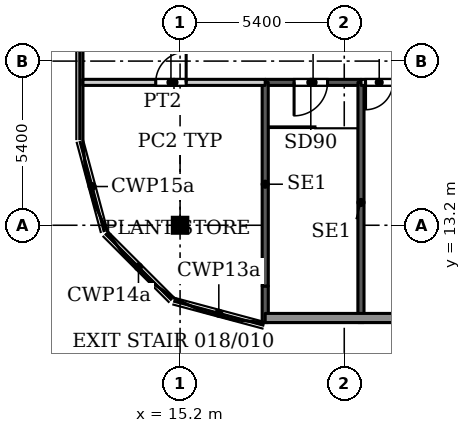
"""IFC4 building model, lengths in metres.
Left out: names, types, materials, properties, quantities, classifications, styles, units other than length and angle.
Written with IfcOpenShell. Run it as: python <this file> out.ifc"""

import sys

from ifc_helpers import new_model, si_unit, direction, frame, frame_2d, origin, origin_2d, place, context, subcontext, project, spatial, rectangle, i_section, extrude, source, transform, mapped, element, fill, save


model = new_model("IFC4")
c1 = context("Model", 3, precision=1e-05, world=origin(), true_north=direction((0.0, 1.0)))
c2 = subcontext(c1, "Body", "Model", "MODEL_VIEW")
j1 = project(units=[si_unit("LENGTHUNIT", "METRE"), si_unit("PLANEANGLEUNIT", "RADIAN")], contexts=[c1])
p1 = place(None, origin())
s1 = spatial("IfcSite", under=j1, at=p1, CompositionType="ELEMENT")
p2 = place(p1, origin())
s2 = spatial("IfcBuilding", under=s1, at=p2, CompositionType="ELEMENT")
p3 = place(p2, frame((0.0, 0.0, 26.0)))
s3 = spatial("IfcBuildingStorey", under=s2, at=p3, CompositionType="ELEMENT", Elevation=26.0)
p4 = place(p3, frame((15.2, 13.2, 0.0), z_axis=(0.0, 0.0, 1.0), x_axis=(1.0, 0.0, 0.0)))
e1 = element("IfcColumn", 1, at=p4, inside=s3, PredefinedType="COLUMN", context=c2, shape_type="SweptSolid", body=[
    extrude(i_section(OverallWidth=0.409, OverallDepth=0.425, WebThickness=0.033, FlangeThickness=0.052, FilletRadius=0.013, at=origin_2d()), origin(), (0.0, 0.0, 1.0), 4.5),
])
p5 = place(p3, frame((65.52, 10.15, 0.0), z_axis=(0.0, 0.0, 1.0), x_axis=(-1.0, 0.0, 0.0)))
e2 = element("IfcWall", 2, at=p5, inside=s3, PredefinedType="SOLIDWALL", context=c2, shape_type="SweptSolid", body=[
    extrude(rectangle(XDim=47.52, YDim=0.3, at=frame_2d((23.76, 0.0))), origin(), (0.0, 0.0, 1.0), 4.25),
])
p6 = place(p5, frame((1.683, 0.0, 2.4)))
e3 = element("IfcOpeningElement", 3, at=p6, cuts=e2, PredefinedType="OPENING", context=c2, shape_type="SweptSolid", body=[
    extrude(rectangle(XDim=2.7, YDim=1.2, at=frame_2d((1.35, 0.6))), frame((0.0, 0.16, 0.0), z_axis=(0.0, -1.0, 0.0), x_axis=(1.0, 0.0, 0.0)), (0.0, 0.0, 1.0), 0.32),
])
p7 = place(p5, frame((7.15, 0.0, 2.4)))
e4 = element("IfcOpeningElement", 4, at=p7, cuts=e2, PredefinedType="OPENING", context=c2, shape_type="SweptSolid", body=[
    extrude(rectangle(XDim=2.7, YDim=1.2, at=frame_2d((1.35, 0.6))), frame((0.0, 0.16, 0.0), z_axis=(0.0, -1.0, 0.0), x_axis=(1.0, 0.0, 0.0)), (0.0, 0.0, 1.0), 0.32),
])
p8 = place(p5, frame((12.617, 0.0, 2.4)))
e5 = element("IfcOpeningElement", 5, at=p8, cuts=e2, PredefinedType="OPENING", context=c2, shape_type="SweptSolid", body=[
    extrude(rectangle(XDim=2.7, YDim=1.2, at=frame_2d((1.35, 0.6))), frame((0.0, 0.16, 0.0), z_axis=(0.0, -1.0, 0.0), x_axis=(1.0, 0.0, 0.0)), (0.0, 0.0, 1.0), 0.32),
])
p9 = place(p5, frame((19.06, 0.0, 2.4)))
e6 = element("IfcOpeningElement", 6, at=p9, cuts=e2, PredefinedType="OPENING", context=c2, shape_type="SweptSolid", body=[
    extrude(rectangle(XDim=2.7, YDim=1.2, at=frame_2d((1.35, 0.6))), frame((0.0, 0.16, 0.0), z_axis=(0.0, -1.0, 0.0), x_axis=(1.0, 0.0, 0.0)), (0.0, 0.0, 1.0), 0.32),
])
p10 = place(p5, frame((25.28, 0.0, 2.4)))
e7 = element("IfcOpeningElement", 7, at=p10, cuts=e2, PredefinedType="OPENING", context=c2, shape_type="SweptSolid", body=[
    extrude(rectangle(XDim=2.7, YDim=1.2, at=frame_2d((1.35, 0.6))), frame((0.0, 0.16, 0.0), z_axis=(0.0, -1.0, 0.0), x_axis=(1.0, 0.0, 0.0)), (0.0, 0.0, 1.0), 0.32),
])
p11 = place(p5, frame((32.1, 0.0, 2.4)))
e8 = element("IfcOpeningElement", 8, at=p11, cuts=e2, PredefinedType="OPENING", context=c2, shape_type="SweptSolid", body=[
    extrude(rectangle(XDim=2.7, YDim=1.2, at=frame_2d((1.35, 0.6))), frame((0.0, 0.16, 0.0), z_axis=(0.0, -1.0, 0.0), x_axis=(1.0, 0.0, 0.0)), (0.0, 0.0, 1.0), 0.32),
])
p12 = place(p5, frame((38.32, 0.0, 2.4)))
e9 = element("IfcOpeningElement", 9, at=p12, cuts=e2, PredefinedType="OPENING", context=c2, shape_type="SweptSolid", body=[
    extrude(rectangle(XDim=2.7, YDim=1.2, at=frame_2d((1.35, 0.6))), frame((0.0, 0.16, 0.0), z_axis=(0.0, -1.0, 0.0), x_axis=(1.0, 0.0, 0.0)), (0.0, 0.0, 1.0), 0.32),
])
p13 = place(p3, frame((18.0, 17.9, 0.0), z_axis=(0.0, 0.0, 1.0), x_axis=(1.0, 0.0, 0.0)))
e10 = element("IfcWall", 10, at=p13, inside=s3, PredefinedType="SHEAR", context=c2, shape_type="SweptSolid", body=[
    extrude(rectangle(XDim=3.15, YDim=0.2, at=frame_2d((1.575, 0.0))), origin(), (0.0, 0.0, 1.0), 4.5),
])
p14 = place(p13, frame((0.95, 0.0, 0.0)))
e11 = element("IfcOpeningElement", 11, at=p14, cuts=e10, PredefinedType="OPENING", context=c2, shape_type="SweptSolid", body=[
    extrude(rectangle(XDim=1.1, YDim=2.2, at=frame_2d((0.55, 1.1))), frame((0.0, 0.11, 0.0), z_axis=(0.0, -1.0, 0.0), x_axis=(1.0, 0.0, 0.0)), (0.0, 0.0, 1.0), 0.22),
])
p15 = place(p3, frame((18.0, 10.0, 0.0), z_axis=(0.0, 0.0, 1.0), x_axis=(0.0, 1.0, 0.0)))
e12 = element("IfcWall", 12, at=p15, inside=s3, PredefinedType="SHEAR", context=c2, shape_type="SweptSolid", body=[
    extrude(rectangle(XDim=1.2, YDim=0.2, at=frame_2d((0.6, 0.0))), origin(), (0.0, 0.0, 1.0), 4.5),
])
p16 = place(p3, frame((18.0, 11.2, 0.0), z_axis=(0.0, 0.0, 1.0), x_axis=(0.0, 1.0, 0.0)))
e13 = element("IfcWall", 13, at=p16, inside=s3, PredefinedType="SHEAR", context=c2, shape_type="SweptSolid", body=[
    extrude(rectangle(XDim=6.7, YDim=0.2, at=frame_2d((3.35, 0.0))), origin(), (0.0, 0.0, 1.0), 4.5),
])
p17 = place(p3, frame((21.15, 10.0, 0.0), z_axis=(0.0, 0.0, 1.0), x_axis=(0.0, 1.0, 0.0)))
e14 = element("IfcWall", 14, at=p17, inside=s3, PredefinedType="SHEAR", context=c2, shape_type="SweptSolid", body=[
    extrude(rectangle(XDim=7.9, YDim=0.2, at=frame_2d((3.95, 0.0))), origin(), (0.0, 0.0, 1.0), 4.5),
])
p18 = place(p3, frame((12.0, 17.9, 0.0), z_axis=(0.0, 0.0, 1.0), x_axis=(1.0, 0.0, 0.0)))
e15 = element("IfcWall", 15, at=p18, inside=s3, PredefinedType="PARTITIONING", context=c2, shape_type="SweptSolid", body=[
    extrude(rectangle(XDim=6.0, YDim=0.2, at=frame_2d((3.0, 0.0))), origin(), (0.0, 0.0, 1.0), 4.2),
])
p19 = place(p18, frame((2.4, 0.0, 0.0)))
e16 = element("IfcOpeningElement", 16, at=p19, cuts=e15, PredefinedType="OPENING", context=c2, shape_type="SweptSolid", body=[
    extrude(rectangle(XDim=1.0, YDim=2.1, at=frame_2d((0.5, 1.05))), frame((0.0, 0.11, 0.0), z_axis=(0.0, -1.0, 0.0), x_axis=(1.0, 0.0, 0.0)), (0.0, 0.0, 1.0), 0.22),
])
p20 = place(p3, frame((21.15, 17.9, 0.0), z_axis=(0.0, 0.0, 1.0), x_axis=(1.0, 0.0, 0.0)))
e17 = element("IfcWall", 17, at=p20, inside=s3, PredefinedType="PARTITIONING", context=c2, shape_type="SweptSolid", body=[
    extrude(rectangle(XDim=96.85, YDim=0.2, at=frame_2d((48.425, 0.0))), origin(), (0.0, 0.0, 1.0), 4.2),
])
p21 = place(p20, frame((0.15, 0.0, 0.0)))
e18 = element("IfcOpeningElement", 18, at=p21, cuts=e17, PredefinedType="OPENING", context=c2, shape_type="SweptSolid", body=[
    extrude(rectangle(XDim=0.9, YDim=2.1, at=frame_2d((0.45, 1.05))), frame((0.0, 0.11, 0.0), z_axis=(0.0, -1.0, 0.0), x_axis=(1.0, 0.0, 0.0)), (0.0, 0.0, 1.0), 0.22),
])
p22 = place(p20, frame((7.185, 0.0, 0.0)))
e19 = element("IfcOpeningElement", 19, at=p22, cuts=e17, PredefinedType="OPENING", context=c2, shape_type="SweptSolid", body=[
    extrude(rectangle(XDim=1.0, YDim=2.1, at=frame_2d((0.5, 1.05))), frame((0.0, 0.11, 0.0), z_axis=(0.0, -1.0, 0.0), x_axis=(1.0, 0.0, 0.0)), (0.0, 0.0, 1.0), 0.22),
])
p23 = place(p20, frame((20.228, 0.0, 0.0)))
e20 = element("IfcOpeningElement", 20, at=p23, cuts=e17, PredefinedType="OPENING", context=c2, shape_type="SweptSolid", body=[
    extrude(rectangle(XDim=1.0, YDim=2.1, at=frame_2d((0.5, 1.05))), frame((0.0, 0.11, 0.0), z_axis=(0.0, -1.0, 0.0), x_axis=(1.0, 0.0, 0.0)), (0.0, 0.0, 1.0), 0.22),
])
p24 = place(p20, frame((36.022, 0.0, 0.0)))
e21 = element("IfcOpeningElement", 21, at=p24, cuts=e17, PredefinedType="OPENING", context=c2, shape_type="SweptSolid", body=[
    extrude(rectangle(XDim=1.0, YDim=2.1, at=frame_2d((0.5, 1.05))), frame((0.0, 0.11, 0.0), z_axis=(0.0, -1.0, 0.0), x_axis=(1.0, 0.0, 0.0)), (0.0, 0.0, 1.0), 0.22),
])
p25 = place(p20, frame((51.533, 0.0, 0.0)))
e22 = element("IfcOpeningElement", 22, at=p25, cuts=e17, PredefinedType="OPENING", context=c2, shape_type="SweptSolid", body=[
    extrude(rectangle(XDim=1.0, YDim=2.1, at=frame_2d((0.5, 1.05))), frame((0.0, 0.11, 0.0), z_axis=(0.0, -1.0, 0.0), x_axis=(1.0, 0.0, 0.0)), (0.0, 0.0, 1.0), 0.22),
])
p26 = place(p20, frame((62.076, 0.0, 0.0)))
e23 = element("IfcOpeningElement", 23, at=p26, cuts=e17, PredefinedType="OPENING", context=c2, shape_type="SweptSolid", body=[
    extrude(rectangle(XDim=1.0, YDim=2.1, at=frame_2d((0.5, 1.05))), frame((0.0, 0.11, 0.0), z_axis=(0.0, -1.0, 0.0), x_axis=(1.0, 0.0, 0.0)), (0.0, 0.0, 1.0), 0.22),
])
p27 = place(p20, frame((76.402, 0.0, 0.0)))
e24 = element("IfcOpeningElement", 24, at=p27, cuts=e17, PredefinedType="OPENING", context=c2, shape_type="SweptSolid", body=[
    extrude(rectangle(XDim=1.0, YDim=2.1, at=frame_2d((0.5, 1.05))), frame((0.0, 0.11, 0.0), z_axis=(0.0, -1.0, 0.0), x_axis=(1.0, 0.0, 0.0)), (0.0, 0.0, 1.0), 0.22),
])
p28 = place(p20, frame((91.522, 0.0, 0.0)))
e25 = element("IfcOpeningElement", 25, at=p28, cuts=e17, PredefinedType="OPENING", context=c2, shape_type="SweptSolid", body=[
    extrude(rectangle(XDim=1.0, YDim=2.1, at=frame_2d((0.5, 1.05))), frame((0.0, 0.11, 0.0), z_axis=(0.0, -1.0, 0.0), x_axis=(1.0, 0.0, 0.0)), (0.0, 0.0, 1.0), 0.22),
])
m1 = source(origin(), c2, "Body", "SweptSolid", [
    extrude(rectangle(XDim=1.1, YDim=2.2, at=frame_2d((0.55, 1.1))), frame((0.0, 0.025, 0.0), z_axis=(0.0, -1.0, 0.0), x_axis=(1.0, 0.0, 0.0)), (0.0, 0.0, 1.0), 0.05),
])
p29 = place(p14, origin())
e26 = element("IfcDoor", 26, at=p29, inside=s3, OperationType="SINGLE_SWING_RIGHT", PredefinedType="DOOR", context=c2, shape_type="MappedRepresentation", body=[
    mapped(m1, transform((0.0, 0.0, 0.0), x_axis=(1.0, 0.0, 0.0), y_axis=(0.0, 1.0, 0.0), z_axis=(0.0, 0.0, 1.0), scale=1.0)),
])
fill(e11, e26)
m2 = source(origin(), c2, "Body", "SweptSolid", [
    extrude(rectangle(XDim=1.0, YDim=2.1, at=frame_2d((0.5, 1.05))), frame((0.0, 0.025, 0.0), z_axis=(0.0, -1.0, 0.0), x_axis=(1.0, 0.0, 0.0)), (0.0, 0.0, 1.0), 0.05),
])
p30 = place(p19, origin())
e27 = element("IfcDoor", 27, at=p30, inside=s3, OperationType="SINGLE_SWING_LEFT", PredefinedType="DOOR", context=c2, shape_type="MappedRepresentation", body=[
    mapped(m2, transform((0.0, 0.0, 0.0), x_axis=(1.0, 0.0, 0.0), y_axis=(0.0, 1.0, 0.0), z_axis=(0.0, 0.0, 1.0), scale=1.0)),
])
fill(e16, e27)
m3 = source(origin(), c2, "Body", "SweptSolid", [
    extrude(rectangle(XDim=0.9, YDim=2.1, at=frame_2d((0.45, 1.05))), frame((0.0, 0.025, 0.0), z_axis=(0.0, -1.0, 0.0), x_axis=(1.0, 0.0, 0.0)), (0.0, 0.0, 1.0), 0.05),
])
p31 = place(p21, origin())
e28 = element("IfcDoor", 28, at=p31, inside=s3, OperationType="SINGLE_SWING_RIGHT", PredefinedType="DOOR", context=c2, shape_type="MappedRepresentation", body=[
    mapped(m3, transform((0.0, 0.0, 0.0), x_axis=(1.0, 0.0, 0.0), y_axis=(0.0, 1.0, 0.0), z_axis=(0.0, 0.0, 1.0), scale=1.0)),
])
fill(e18, e28)
save(model, sys.argv[1])
